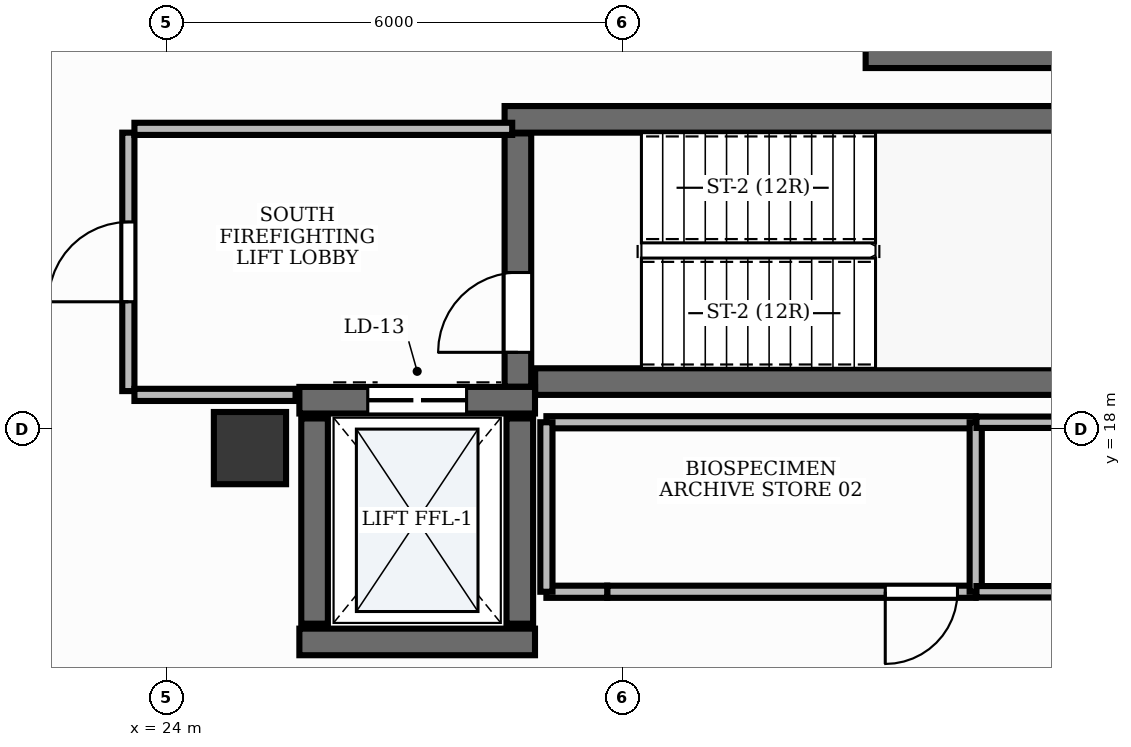
"""IFC4 building model, lengths in metres.
Left out: names, types, materials, properties, quantities, classifications, styles, units other than length and angle.
Written with IfcOpenShell. Run it as: python <this file> out.ifc"""

import sys

from ifc_helpers import new_model, si_unit, direction, frame, frame_2d, origin, origin_2d, place, context, subcontext, project, spatial, rectangle, extrude, element, fill, save


model = new_model("IFC4")
c1 = context("Model", 3, precision=1e-05, world=origin(), true_north=direction((0.0, 1.0)))
c2 = subcontext(c1, "Body", "Model", "MODEL_VIEW")
j1 = project(units=[si_unit("LENGTHUNIT", "METRE"), si_unit("PLANEANGLEUNIT", "RADIAN")], contexts=[c1])
p1 = place(None, origin())
s1 = spatial("IfcSite", under=j1, at=p1, CompositionType="ELEMENT")
p2 = place(p1, origin())
s2 = spatial("IfcBuilding", under=s1, at=p2, CompositionType="ELEMENT")
p3 = place(p2, frame((0.0, 0.0, 314.4)))
s3 = spatial("IfcBuildingStorey", under=s2, at=p3, CompositionType="ELEMENT", Elevation=314.4)
p4 = place(p3, frame((28.852, 18.625, 0.0), z_axis=(0.0, 0.0, 1.0), x_axis=(1.0, 0.0, 0.0)))
e1 = element("IfcWall", 1, at=p4, inside=s3, PredefinedType="SHEAR", context=c2, shape_type="SweptSolid", body=[
    extrude(rectangle(XDim=8.148, YDim=0.35, at=frame_2d((4.074, 0.0))), origin(), (0.0, 0.0, 1.0), 3.9),
])
p5 = place(p3, frame((28.45, 22.075, 0.0), z_axis=(0.0, 0.0, 1.0), x_axis=(1.0, 0.0, 0.0)))
e2 = element("IfcWall", 2, at=p5, inside=s3, PredefinedType="SHEAR", context=c2, shape_type="SweptSolid", body=[
    extrude(rectangle(XDim=8.55, YDim=0.35, at=frame_2d((4.275, 0.0))), origin(), (0.0, 0.0, 1.0), 3.9),
])
p6 = place(p3, frame((28.625, 18.557, 0.0), z_axis=(0.0, 0.0, 1.0), x_axis=(0.0, 1.0, 0.0)))
e3 = element("IfcWall", 3, at=p6, inside=s3, PredefinedType="SHEAR", context=c2, shape_type="SweptSolid", body=[
    extrude(rectangle(XDim=3.333, YDim=0.35, at=frame_2d((1.667, 0.0))), origin(), (0.0, 0.0, 1.0), 3.9),
])
p7 = place(p6, frame((0.453, 0.0, 0.0)))
e4 = element("IfcOpeningElement", 4, at=p7, cuts=e3, PredefinedType="OPENING", context=c2, shape_type="SweptSolid", body=[
    extrude(rectangle(XDim=1.05, YDim=2.15, at=frame_2d((0.525, 1.075))), frame((0.0, 0.19, 0.0), z_axis=(0.0, -1.0, 0.0), x_axis=(1.0, 0.0, 0.0)), (0.0, 0.0, 1.0), 0.38),
])
p8 = place(p3, frame((33.2, 22.925, 0.0), z_axis=(0.0, 0.0, 1.0), x_axis=(1.0, 0.0, 0.0)))
e5 = element("IfcWall", 5, at=p8, inside=s3, PredefinedType="SHEAR", context=c2, shape_type="SweptSolid", body=[
    extrude(rectangle(XDim=3.8, YDim=0.35, at=frame_2d((1.9, 0.0))), origin(), (0.0, 0.0, 1.0), 3.9),
])
p9 = place(p3, frame((25.75, 15.2, 0.0), z_axis=(0.0, 0.0, 1.0), x_axis=(1.0, 0.0, 0.0)))
e6 = element("IfcWall", 6, at=p9, inside=s3, PredefinedType="SHEAR", context=c2, shape_type="SweptSolid", body=[
    extrude(rectangle(XDim=3.1, YDim=0.35, at=frame_2d((1.55, 0.0))), origin(), (0.0, 0.0, 1.0), 3.9),
])
p10 = place(p3, frame((25.75, 18.38, 0.0), z_axis=(0.0, 0.0, 1.0), x_axis=(1.0, 0.0, 0.0)))
e7 = element("IfcWall", 7, at=p10, inside=s3, PredefinedType="SHEAR", context=c2, shape_type="SweptSolid", body=[
    extrude(rectangle(XDim=3.1, YDim=0.35, at=frame_2d((1.55, 0.0))), origin(), (0.0, 0.0, 1.0), 3.9),
])
p11 = place(p10, frame((0.9, 0.0, 0.0)))
e8 = element("IfcOpeningElement", 8, at=p11, cuts=e7, PredefinedType="OPENING", context=c2, shape_type="SweptSolid", body=[
    extrude(rectangle(XDim=1.3, YDim=2.2, at=frame_2d((0.65, 1.1))), frame((0.0, 0.19, 0.0), z_axis=(0.0, -1.0, 0.0), x_axis=(1.0, 0.0, 0.0)), (0.0, 0.0, 1.0), 0.38),
])
for number, where, z_axis, x_axis in (
    (9, (25.95, 15.44, 0.0), (0.0, 0.0, 1.0), (0.0, 1.0, 0.0)),
    (10, (28.65, 15.44, 0.0), (0.0, 0.0, 1.0), (0.0, 1.0, 0.0)),
):
    element("IfcWall", number, at=place(p3, frame(where, z_axis=z_axis, x_axis=x_axis)), inside=s3, PredefinedType="SHEAR", context=c2, shape_type="SweptSolid", body=[
        extrude(rectangle(XDim=2.7, YDim=0.35, at=frame_2d((1.35, 0.0))), origin(), (0.0, 0.0, 1.0), 3.9),
    ])
p12 = place(p3, frame((25.1, 17.75, -0.0), z_axis=(0.0, 0.0, 1.0), x_axis=(1.0, 0.0, 0.0)))
e11 = element("IfcColumn", 11, at=p12, inside=s3, PredefinedType="PILASTER", context=c2, shape_type="SweptSolid", body=[
    extrude(rectangle(XDim=0.95, YDim=0.95, at=origin_2d()), origin(), (0.0, 0.0, 1.0), 3.901),
])
p13 = place(p3, frame((23.5, 18.5, 0.0), z_axis=(0.0, 0.0, 1.0), x_axis=(0.0, 1.0, 0.0)))
e12 = element("IfcWall", 12, at=p13, inside=s3, PredefinedType="PARTITIONING", context=c2, shape_type="SweptSolid", body=[
    extrude(rectangle(XDim=3.4, YDim=0.16, at=frame_2d((1.7, 0.0))), origin(), (0.0, 0.0, 1.0), 2.22),
])
p14 = place(p13, frame((1.175, 0.0, 0.0)))
e13 = element("IfcOpeningElement", 13, at=p14, cuts=e12, PredefinedType="OPENING", context=c2, shape_type="SweptSolid", body=[
    extrude(rectangle(XDim=1.05, YDim=2.15, at=frame_2d((0.525, 1.075))), frame((0.0, 0.095, 0.0), z_axis=(0.0, -1.0, 0.0), x_axis=(1.0, 0.0, 0.0)), (0.0, 0.0, 1.0), 0.19),
])
p15 = place(p3, frame((23.58, 21.95, 0.0), z_axis=(0.0, 0.0, 1.0), x_axis=(1.0, 0.0, 0.0)))
e14 = element("IfcWall", 14, at=p15, inside=s3, PredefinedType="PARTITIONING", context=c2, shape_type="SweptSolid", body=[
    extrude(rectangle(XDim=4.97, YDim=0.16, at=frame_2d((2.485, 0.0))), origin(), (0.0, 0.0, 1.0), 2.22),
])
p16 = place(p3, frame((23.58, 18.45, 0.0), z_axis=(0.0, 0.0, 1.0), x_axis=(1.0, 0.0, 0.0)))
e15 = element("IfcWall", 15, at=p16, inside=s3, PredefinedType="PARTITIONING", context=c2, shape_type="SweptSolid", body=[
    extrude(rectangle(XDim=2.12, YDim=0.16, at=frame_2d((1.06, 0.0))), origin(), (0.0, 0.0, 1.0), 2.22),
])
p17 = place(p3, frame((34.648, 15.86, 0.0), z_axis=(0.0, 0.0, 1.0), x_axis=(-1.0, 0.0, 0.0)))
e16 = element("IfcWall", 16, at=p17, inside=s3, PredefinedType="PARTITIONING", context=c2, shape_type="SweptSolid", body=[
    extrude(rectangle(XDim=4.848, YDim=0.16, at=frame_2d((2.424, 0.0))), origin(), (0.0, 0.0, 1.0), 2.22),
])
p18 = place(p17, frame((0.24, 0.0, 0.0)))
e17 = element("IfcOpeningElement", 17, at=p18, cuts=e16, PredefinedType="OPENING", context=c2, shape_type="SweptSolid", body=[
    extrude(rectangle(XDim=0.95, YDim=2.15, at=frame_2d((0.475, 1.075))), frame((0.0, 0.095, 0.0), z_axis=(0.0, -1.0, 0.0), x_axis=(1.0, 0.0, 0.0)), (0.0, 0.0, 1.0), 0.19),
])
p19 = place(p3, frame((29.0, 18.09, 0.0), z_axis=(0.0, 0.0, 1.0), x_axis=(1.0, 0.0, 0.0)))
e18 = element("IfcWall", 18, at=p19, inside=s3, PredefinedType="PARTITIONING", context=c2, shape_type="SweptSolid", body=[
    extrude(rectangle(XDim=5.648, YDim=0.16, at=frame_2d((2.824, 0.0))), origin(), (0.0, 0.0, 1.0), 2.22),
])
p20 = place(p3, frame((34.648, 18.09, 0.0), z_axis=(0.0, 0.0, 1.0), x_axis=(0.0, -1.0, 0.0)))
e19 = element("IfcWall", 19, at=p20, inside=s3, PredefinedType="PARTITIONING", context=c2, shape_type="SweptSolid", body=[
    extrude(rectangle(XDim=2.23, YDim=0.16, at=frame_2d((1.115, 0.0))), origin(), (0.0, 0.0, 1.0), 2.22),
])
p21 = place(p3, frame((29.8, 15.86, 0.0), z_axis=(0.0, 0.0, 1.0), x_axis=(-1.0, 0.0, 0.0)))
e20 = element("IfcWall", 20, at=p21, inside=s3, PredefinedType="PARTITIONING", context=c2, shape_type="SweptSolid", body=[
    extrude(rectangle(XDim=0.8, YDim=0.16, at=frame_2d((0.4, 0.0))), origin(), (0.0, 0.0, 1.0), 2.22),
])
p22 = place(p3, frame((29.0, 15.86, 0.0), z_axis=(0.0, 0.0, 1.0), x_axis=(0.0, 1.0, 0.0)))
e21 = element("IfcWall", 21, at=p22, inside=s3, PredefinedType="PARTITIONING", context=c2, shape_type="SweptSolid", body=[
    extrude(rectangle(XDim=2.23, YDim=0.16, at=frame_2d((1.115, 0.0))), origin(), (0.0, 0.0, 1.0), 2.22),
])
p23 = place(p3, frame((35.84, 15.86, 0.0), z_axis=(0.0, 0.0, 1.0), x_axis=(-1.0, 0.0, 0.0)))
e22 = element("IfcWall", 22, at=p23, inside=s3, PredefinedType="PARTITIONING", context=c2, shape_type="SweptSolid", body=[
    extrude(rectangle(XDim=1.182, YDim=0.15, at=frame_2d((0.591, 0.0))), origin(), (0.0, 0.0, 1.0), 2.22),
])
p24 = place(p3, frame((34.658, 18.09, 0.0), z_axis=(0.0, 0.0, 1.0), x_axis=(1.0, 0.0, 0.0)))
e23 = element("IfcWall", 23, at=p24, inside=s3, PredefinedType="PARTITIONING", context=c2, shape_type="SweptSolid", body=[
    extrude(rectangle(XDim=2.692, YDim=0.15, at=frame_2d((1.346, 0.0))), origin(), (0.0, 0.0, 1.0), 2.22),
])
p25 = place(p7, origin())
e24 = element("IfcDoor", 24, at=p25, inside=s3, OperationType="SINGLE_SWING_LEFT", PredefinedType="DOOR", context=c2, shape_type="SweptSolid", body=[
    extrude(rectangle(XDim=1.05, YDim=2.15, at=frame_2d((0.525, 1.075))), frame((0.0, 0.025, 0.0), z_axis=(0.0, -1.0, 0.0), x_axis=(1.0, 0.0, 0.0)), (0.0, 0.0, 1.0), 0.05),
])
fill(e4, e24)
p26 = place(p11, origin())
e25 = element("IfcDoor", 25, at=p26, inside=s3, OperationType="DOUBLE_DOOR_SLIDING", PredefinedType="DOOR", context=c2, shape_type="SweptSolid", body=[
    extrude(rectangle(XDim=1.3, YDim=2.2, at=frame_2d((0.65, 1.1))), frame((0.0, 0.025, 0.0), z_axis=(0.0, -1.0, 0.0), x_axis=(1.0, 0.0, 0.0)), (0.0, 0.0, 1.0), 0.05),
])
fill(e8, e25)
p27 = place(p14, origin())
e26 = element("IfcDoor", 26, at=p27, inside=s3, OperationType="SINGLE_SWING_LEFT", PredefinedType="DOOR", context=c2, shape_type="SweptSolid", body=[
    extrude(rectangle(XDim=1.05, YDim=2.15, at=frame_2d((0.525, 1.075))), frame((0.0, 0.025, 0.0), z_axis=(0.0, -1.0, 0.0), x_axis=(1.0, 0.0, 0.0)), (0.0, 0.0, 1.0), 0.05),
])
fill(e13, e26)
p28 = place(p18, origin())
e27 = element("IfcDoor", 27, at=p28, inside=s3, OperationType="SINGLE_SWING_RIGHT", PredefinedType="DOOR", context=c2, shape_type="SweptSolid", body=[
    extrude(rectangle(XDim=0.95, YDim=2.15, at=frame_2d((0.475, 1.075))), frame((0.0, 0.025, 0.0), z_axis=(0.0, -1.0, 0.0), x_axis=(1.0, 0.0, 0.0)), (0.0, 0.0, 1.0), 0.05),
])
fill(e17, e27)
save(model, sys.argv[1])
